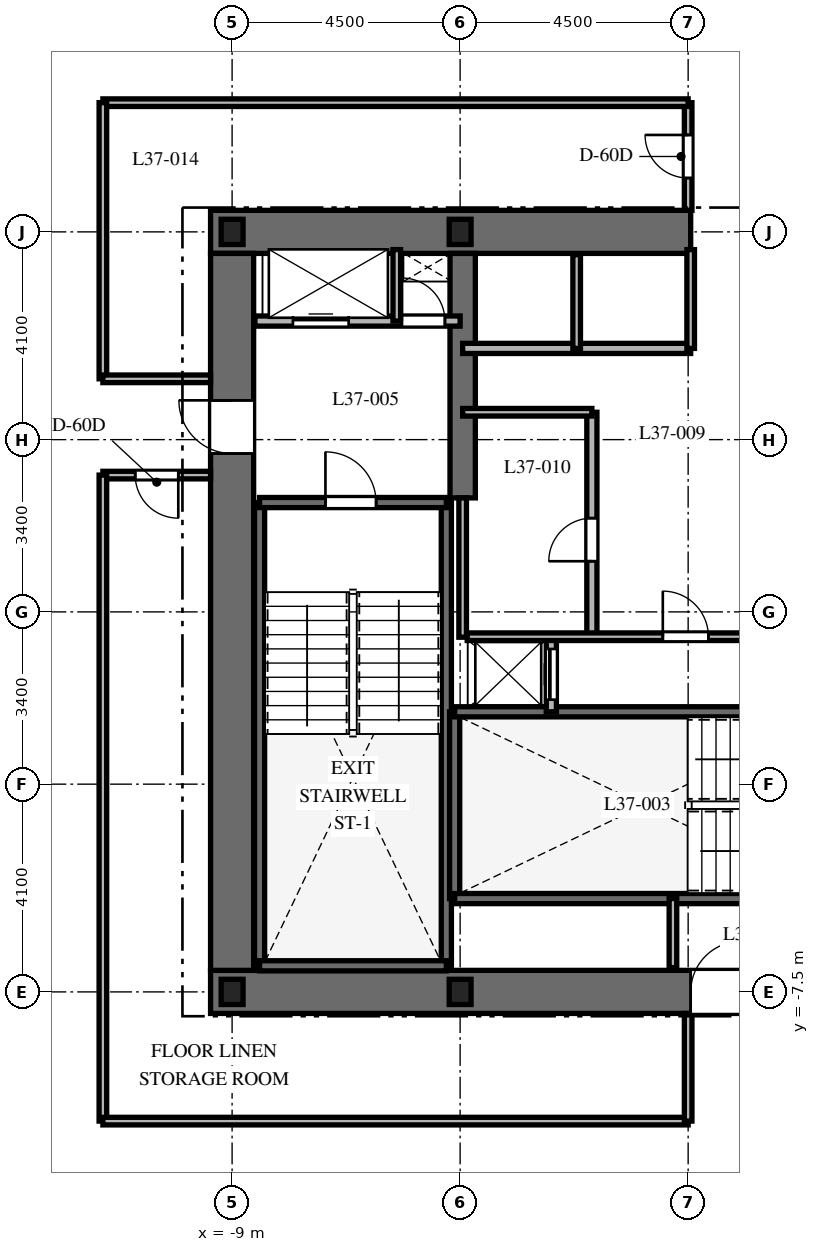
"""IFC4 building model, lengths in metres.
Left out: names, types, materials, properties, quantities, classifications, styles, units other than length and angle.
Written with IfcOpenShell. Run it as: python <this file> out.ifc"""

import sys

from ifc_helpers import new_model, si_unit, direction, frame, frame_2d, origin, origin_2d, place, context, subcontext, project, spatial, rectangle, i_section, extrude, element, fill, save


model = new_model("IFC4")
c1 = context("Model", 3, precision=1e-05, world=origin(), true_north=direction((0.0, 1.0)))
c2 = subcontext(c1, "Body", "Model", "MODEL_VIEW")
j1 = project(units=[si_unit("LENGTHUNIT", "METRE"), si_unit("PLANEANGLEUNIT", "RADIAN")], contexts=[c1])
p1 = place(None, origin())
s1 = spatial("IfcSite", under=j1, at=p1, CompositionType="ELEMENT")
p2 = place(p1, origin())
s2 = spatial("IfcBuilding", under=s1, at=p2, CompositionType="ELEMENT")
p3 = place(p2, frame((0.0, 0.0, 151.7)))
s3 = spatial("IfcBuildingStorey", under=s2, at=p3, CompositionType="ELEMENT", Elevation=151.7)
p4 = place(p3, frame((-9.425, -7.5, 0.0), z_axis=(0.0, 0.0, 1.0), x_axis=(1.0, 0.0, 0.0)))
e1 = element("IfcWall", 1, at=p4, inside=s3, PredefinedType="SHEAR", context=c2, shape_type="SweptSolid", body=[
    extrude(rectangle(XDim=18.85, YDim=0.85, at=frame_2d((9.425, 0.0))), origin(), (0.0, 0.0, 1.0), 3.7),
])
p5 = place(p4, frame((9.475, 0.0, 0.0)))
e2 = element("IfcOpeningElement", 2, at=p5, cuts=e1, PredefinedType="OPENING", context=c2, shape_type="SweptSolid", body=[
    extrude(rectangle(XDim=1.0, YDim=2.15, at=frame_2d((0.5, 1.075))), frame((0.0, 0.435, 0.0), z_axis=(0.0, -1.0, 0.0), x_axis=(1.0, 0.0, 0.0)), (0.0, 0.0, 1.0), 0.87),
])
p6 = place(p3, frame((-9.425, 7.5, 0.0), z_axis=(0.0, 0.0, 1.0), x_axis=(1.0, 0.0, 0.0)))
e3 = element("IfcWall", 3, at=p6, inside=s3, PredefinedType="SHEAR", context=c2, shape_type="SweptSolid", body=[
    extrude(rectangle(XDim=9.475, YDim=0.85, at=frame_2d((4.738, 0.0))), origin(), (0.0, 0.0, 1.0), 3.7),
])
p7 = place(p3, frame((-9.0, -7.075, 0.0), z_axis=(0.0, 0.0, 1.0), x_axis=(0.0, 1.0, 0.0)))
e4 = element("IfcWall", 4, at=p7, inside=s3, PredefinedType="SHEAR", context=c2, shape_type="SweptSolid", body=[
    extrude(rectangle(XDim=14.15, YDim=0.85, at=frame_2d((7.075, 0.0))), origin(), (0.0, 0.0, 1.0), 3.7),
])
p8 = place(p7, frame((10.2, 0.0, 0.0)))
e5 = element("IfcOpeningElement", 5, at=p8, cuts=e4, PredefinedType="OPENING", context=c2, shape_type="SweptSolid", body=[
    extrude(rectangle(XDim=1.05, YDim=2.15, at=frame_2d((0.525, 1.075))), frame((0.0, 0.435, 0.0), z_axis=(0.0, -1.0, 0.0), x_axis=(1.0, 0.0, 0.0)), (0.0, 0.0, 1.0), 0.87),
])
p9 = place(p3, frame((-4.45, 2.25, 0.0), z_axis=(0.0, 0.0, 1.0), x_axis=(0.0, 1.0, 0.0)))
e6 = element("IfcWall", 6, at=p9, inside=s3, PredefinedType="SHEAR", context=c2, shape_type="SweptSolid", body=[
    extrude(rectangle(XDim=4.825, YDim=0.5, at=frame_2d((2.413, 0.0))), origin(), (0.0, 0.0, 1.0), 3.7),
])
for number, where, z_axis, x_axis in (
    (7, (-8.458, -6.985, 0.0), (0.0, 0.0, 1.0), (0.0, 1.0, 0.0)),
    (8, (-4.772, -6.985, 0.0), (0.0, 0.0, 1.0), (0.0, 1.0, 0.0)),
):
    element("IfcWall", number, at=place(p3, frame(where, z_axis=z_axis, x_axis=x_axis)), inside=s3, PredefinedType="SHEAR", context=c2, shape_type="SweptSolid", body=[
        extrude(rectangle(XDim=9.143, YDim=0.2, at=frame_2d((4.572, 0.0))), origin(), (0.0, 0.0, 1.0), 3.7),
    ])
p10 = place(p3, frame((-8.458, -6.985, 0.0), z_axis=(0.0, 0.0, 1.0), x_axis=(1.0, 0.0, 0.0)))
e9 = element("IfcWall", 9, at=p10, inside=s3, PredefinedType="SHEAR", context=c2, shape_type="SweptSolid", body=[
    extrude(rectangle(XDim=3.686, YDim=0.2, at=frame_2d((1.843, 0.0))), origin(), (0.0, 0.0, 1.0), 3.7),
])
p11 = place(p3, frame((-8.458, 2.158, 0.0), z_axis=(0.0, 0.0, 1.0), x_axis=(1.0, 0.0, 0.0)))
e10 = element("IfcWall", 10, at=p11, inside=s3, PredefinedType="SHEAR", context=c2, shape_type="SweptSolid", body=[
    extrude(rectangle(XDim=3.686, YDim=0.2, at=frame_2d((1.843, 0.0))), origin(), (0.0, 0.0, 1.0), 3.7),
])
p12 = place(p11, frame((1.3, 0.0, 0.0)))
e11 = element("IfcOpeningElement", 11, at=p12, cuts=e10, PredefinedType="OPENING", context=c2, shape_type="SweptSolid", body=[
    extrude(rectangle(XDim=1.0, YDim=2.15, at=frame_2d((0.5, 1.075))), frame((0.0, 0.11, 0.0), z_axis=(0.0, -1.0, 0.0), x_axis=(1.0, 0.0, 0.0)), (0.0, 0.0, 1.0), 0.22),
])
p13 = place(p3, frame((-4.608, -5.658, 0.0), z_axis=(0.0, 0.0, 1.0), x_axis=(0.0, 1.0, 0.0)))
e12 = element("IfcWall", 12, at=p13, inside=s3, PredefinedType="SHEAR", context=c2, shape_type="SweptSolid", body=[
    extrude(rectangle(XDim=3.686, YDim=0.2, at=frame_2d((1.843, 0.0))), origin(), (0.0, 0.0, 1.0), 3.7),
])
p14 = place(p3, frame((-4.608, -5.658, 0.0), z_axis=(0.0, 0.0, 1.0), x_axis=(1.0, 0.0, 0.0)))
e13 = element("IfcWall", 13, at=p14, inside=s3, PredefinedType="SHEAR", context=c2, shape_type="SweptSolid", body=[
    extrude(rectangle(XDim=9.166, YDim=0.2, at=frame_2d((4.583, 0.0))), origin(), (0.0, 0.0, 1.0), 3.7),
])
p15 = place(p14, frame((7.45, 0.0, 0.0)))
e14 = element("IfcOpeningElement", 14, at=p15, cuts=e13, PredefinedType="OPENING", context=c2, shape_type="SweptSolid", body=[
    extrude(rectangle(XDim=1.0, YDim=2.15, at=frame_2d((0.5, 1.075))), frame((0.0, 0.11, 0.0), z_axis=(0.0, -1.0, 0.0), x_axis=(1.0, 0.0, 0.0)), (0.0, 0.0, 1.0), 0.22),
])
p16 = place(p3, frame((-4.608, -1.972, 0.0), z_axis=(0.0, 0.0, 1.0), x_axis=(1.0, 0.0, 0.0)))
e15 = element("IfcWall", 15, at=p16, inside=s3, PredefinedType="SHEAR", context=c2, shape_type="SweptSolid", body=[
    extrude(rectangle(XDim=9.166, YDim=0.2, at=frame_2d((4.583, 0.0))), origin(), (0.0, 0.0, 1.0), 3.7),
])
for number, where, z_axis, x_axis in (
    (16, (-9.0, -7.5, 0.0), (0.0, 0.0, 1.0), (1.0, 0.0, 0.0)),
    (17, (-4.5, -7.5, 0.0), (0.0, 0.0, 1.0), (1.0, 0.0, 0.0)),
    (18, (-4.5, 7.5, 0.0), (0.0, 0.0, 1.0), (1.0, 0.0, 0.0)),
    (19, (-9.0, 7.5, 0.0), (0.0, 0.0, 1.0), (1.0, 0.0, 0.0)),
):
    element("IfcColumn", number, at=place(p3, frame(where, z_axis=z_axis, x_axis=x_axis)), inside=s3, PredefinedType="COLUMN", context=c2, shape_type="SweptSolid", body=[
        extrude(i_section(OverallWidth=0.432, OverallDepth=0.498, WebThickness=0.056, FlangeThickness=0.089, at=origin_2d()), origin(), (0.0, 0.0, 1.0), 3.7),
    ])
p17 = place(p3, frame((-0.3, -7.02, 0.0), z_axis=(0.0, 0.0, 1.0), x_axis=(0.0, 1.0, 0.0)))
e20 = element("IfcWall", 20, at=p17, inside=s3, PredefinedType="PARTITIONING", context=c2, shape_type="SweptSolid", body=[
    extrude(rectangle(XDim=1.362, YDim=0.15, at=frame_2d((0.681, 0.0))), origin(), (0.0, 0.0, 1.0), 3.4),
])
p18 = place(p3, frame((-8.55, 5.74, 0.0), z_axis=(0.0, 0.0, 1.0), x_axis=(1.0, 0.0, 0.0)))
e21 = element("IfcWall", 21, at=p18, inside=s3, PredefinedType="PARTITIONING", context=c2, shape_type="SweptSolid", body=[
    extrude(rectangle(XDim=4.05, YDim=0.2, at=frame_2d((2.025, 0.0))), origin(), (0.0, 0.0, 1.0), 3.4),
])
p19 = place(p18, frame((0.75, 0.0, 0.0)))
e22 = element("IfcOpeningElement", 22, at=p19, cuts=e21, PredefinedType="OPENING", context=c2, shape_type="SweptSolid", body=[
    extrude(rectangle(XDim=1.1, YDim=2.2, at=frame_2d((0.55, 1.1))), frame((0.0, 0.11, 0.0), z_axis=(0.0, -1.0, 0.0), x_axis=(1.0, 0.0, 0.0)), (0.0, 0.0, 1.0), 0.22),
])
p20 = place(p18, frame((2.9, 0.0, 0.0)))
e23 = element("IfcOpeningElement", 23, at=p20, cuts=e21, PredefinedType="OPENING", context=c2, shape_type="SweptSolid", body=[
    extrude(rectangle(XDim=0.85, YDim=2.03, at=frame_2d((0.425, 1.015))), frame((0.0, 0.11, 0.0), z_axis=(0.0, -1.0, 0.0), x_axis=(1.0, 0.0, 0.0)), (0.0, 0.0, 1.0), 0.22),
])
p21 = place(p3, frame((-5.75, 5.74, 0.0), z_axis=(0.0, 0.0, 1.0), x_axis=(0.0, 1.0, 0.0)))
e24 = element("IfcWall", 24, at=p21, inside=s3, PredefinedType="PARTITIONING", context=c2, shape_type="SweptSolid", body=[
    extrude(rectangle(XDim=1.41, YDim=0.15, at=frame_2d((0.705, 0.0))), origin(), (0.0, 0.0, 1.0), 3.4),
])
p22 = place(p3, frame((-2.7, -1.972, 0.0), z_axis=(0.0, 0.0, 1.0), x_axis=(0.0, 1.0, 0.0)))
e25 = element("IfcWall", 25, at=p22, inside=s3, PredefinedType="PARTITIONING", context=c2, shape_type="SweptSolid", body=[
    extrude(rectangle(XDim=1.472, YDim=0.2, at=frame_2d((0.736, 0.0))), origin(), (0.0, 0.0, 1.0), 3.4),
])
p23 = place(p22, frame((0.24, 0.0, 0.0)))
e26 = element("IfcOpeningElement", 26, at=p23, cuts=e25, PredefinedType="OPENING", context=c2, shape_type="SweptSolid", body=[
    extrude(rectangle(XDim=1.0, YDim=2.2, at=frame_2d((0.5, 1.1))), frame((0.0, 0.11, 0.0), z_axis=(0.0, -1.0, 0.0), x_axis=(1.0, 0.0, 0.0)), (0.0, 0.0, 1.0), 0.22),
])
p24 = place(p3, frame((-4.45, 5.2, 0.0), z_axis=(0.0, 0.0, 1.0), x_axis=(1.0, 0.0, 0.0)))
e27 = element("IfcWall", 27, at=p24, inside=s3, PredefinedType="PARTITIONING", context=c2, shape_type="SweptSolid", body=[
    extrude(rectangle(XDim=4.5, YDim=0.2, at=frame_2d((2.25, 0.0))), origin(), (0.0, 0.0, 1.0), 3.4),
])
p25 = place(p3, frame((-2.2, 5.2, 0.0), z_axis=(0.0, 0.0, 1.0), x_axis=(0.0, 1.0, 0.0)))
e28 = element("IfcWall", 28, at=p25, inside=s3, PredefinedType="PARTITIONING", context=c2, shape_type="SweptSolid", body=[
    extrude(rectangle(XDim=1.85, YDim=0.15, at=frame_2d((0.925, 0.0))), origin(), (0.0, 0.0, 1.0), 3.4),
])
p26 = place(p3, frame((0.05, 5.2, 0.0), z_axis=(0.0, 0.0, 1.0), x_axis=(0.0, 1.0, 0.0)))
e29 = element("IfcWall", 29, at=p26, inside=s3, PredefinedType="PARTITIONING", context=c2, shape_type="SweptSolid", body=[
    extrude(rectangle(XDim=1.95, YDim=0.15, at=frame_2d((0.975, 0.0))), origin(), (0.0, 0.0, 1.0), 3.4),
])
p27 = place(p3, frame((-4.45, -0.5, 0.0), z_axis=(0.0, 0.0, 1.0), x_axis=(0.0, 1.0, 0.0)))
e30 = element("IfcWall", 30, at=p27, inside=s3, PredefinedType="PARTITIONING", context=c2, shape_type="SweptSolid", body=[
    extrude(rectangle(XDim=2.75, YDim=0.15, at=frame_2d((1.375, 0.0))), origin(), (0.0, 0.0, 1.0), 3.4),
])
p28 = place(p3, frame((-1.9, -0.5, 0.0), z_axis=(0.0, 0.0, 1.0), x_axis=(0.0, 1.0, 0.0)))
e31 = element("IfcWall", 31, at=p28, inside=s3, PredefinedType="PARTITIONING", context=c2, shape_type="SweptSolid", body=[
    extrude(rectangle(XDim=4.44, YDim=0.2, at=frame_2d((2.22, 0.0))), origin(), (0.0, 0.0, 1.0), 3.4),
])
p29 = place(p28, frame((1.5, 0.0, 0.0)))
e32 = element("IfcOpeningElement", 32, at=p29, cuts=e31, PredefinedType="OPENING", context=c2, shape_type="SweptSolid", body=[
    extrude(rectangle(XDim=0.85, YDim=2.03, at=frame_2d((0.425, 1.015))), frame((0.0, 0.11, 0.0), z_axis=(0.0, -1.0, 0.0), x_axis=(1.0, 0.0, 0.0)), (0.0, 0.0, 1.0), 0.22),
])
p30 = place(p3, frame((-4.45, 3.94, 0.0), z_axis=(0.0, 0.0, 1.0), x_axis=(1.0, 0.0, 0.0)))
e33 = element("IfcWall", 33, at=p30, inside=s3, PredefinedType="PARTITIONING", context=c2, shape_type="SweptSolid", body=[
    extrude(rectangle(XDim=2.55, YDim=0.15, at=frame_2d((1.275, 0.0))), origin(), (0.0, 0.0, 1.0), 3.4),
])
p31 = place(p3, frame((-4.36, -0.49, 0.0), z_axis=(0.0, 0.0, 1.0), x_axis=(1.0, 0.0, 0.0)))
e34 = element("IfcWall", 34, at=p31, inside=s3, PredefinedType="PARTITIONING", context=c2, shape_type="SweptSolid", body=[
    extrude(rectangle(XDim=8.72, YDim=0.15, at=frame_2d((4.36, 0.0))), origin(), (0.0, 0.0, 1.0), 3.4),
])
p32 = place(p31, frame((3.86, 0.0, 0.0)))
e35 = element("IfcOpeningElement", 35, at=p32, cuts=e34, PredefinedType="OPENING", context=c2, shape_type="SweptSolid", body=[
    extrude(rectangle(XDim=0.9, YDim=2.03, at=frame_2d((0.45, 1.015))), frame((0.0, 0.085, 0.0), z_axis=(0.0, -1.0, 0.0), x_axis=(1.0, 0.0, 0.0)), (0.0, 0.0, 1.0), 0.17),
])
p33 = place(p3, frame((0.0, 7.925, 0.0), z_axis=(0.0, 0.0, 1.0), x_axis=(0.0, 1.0, 0.0)))
e36 = element("IfcWall", 36, at=p33, inside=s3, PredefinedType="PARTITIONING", context=c2, shape_type="SweptSolid", body=[
    extrude(rectangle(XDim=2.125, YDim=0.15, at=frame_2d((1.062, 0.0))), origin(), (0.0, 0.0, 1.0), 3.4),
])
p34 = place(p33, frame((0.638, 0.0, 0.0)))
e37 = element("IfcOpeningElement", 37, at=p34, cuts=e36, PredefinedType="OPENING", context=c2, shape_type="SweptSolid", body=[
    extrude(rectangle(XDim=0.85, YDim=2.03, at=frame_2d((0.425, 1.015))), frame((0.0, 0.085, 0.0), z_axis=(0.0, -1.0, 0.0), x_axis=(1.0, 0.0, 0.0)), (0.0, 0.0, 1.0), 0.17),
])
p35 = place(p3, frame((0.0, 10.05, 0.0), z_axis=(0.0, 0.0, 1.0), x_axis=(-1.0, 0.0, 0.0)))
e38 = element("IfcWall", 38, at=p35, inside=s3, PredefinedType="PARTITIONING", context=c2, shape_type="SweptSolid", body=[
    extrude(rectangle(XDim=11.55, YDim=0.15, at=frame_2d((5.775, 0.0))), origin(), (0.0, 0.0, 1.0), 2.84),
])
p36 = place(p3, frame((-11.55, 10.05, 0.0), z_axis=(0.0, 0.0, 1.0), x_axis=(0.0, -1.0, 0.0)))
e39 = element("IfcWall", 39, at=p36, inside=s3, PredefinedType="PARTITIONING", context=c2, shape_type="SweptSolid", body=[
    extrude(rectangle(XDim=5.45, YDim=0.15, at=frame_2d((2.725, 0.0))), origin(), (0.0, 0.0, 1.0), 2.84),
])
p37 = place(p3, frame((-11.55, 4.6, 0.0), z_axis=(0.0, 0.0, 1.0), x_axis=(1.0, 0.0, 0.0)))
e40 = element("IfcWall", 40, at=p37, inside=s3, PredefinedType="PARTITIONING", context=c2, shape_type="SweptSolid", body=[
    extrude(rectangle(XDim=2.125, YDim=0.15, at=frame_2d((1.062, 0.0))), origin(), (0.0, 0.0, 1.0), 3.4),
])
p38 = place(p3, frame((-9.425, 2.7, 0.0), z_axis=(0.0, 0.0, 1.0), x_axis=(-1.0, 0.0, 0.0)))
e41 = element("IfcWall", 41, at=p38, inside=s3, PredefinedType="PARTITIONING", context=c2, shape_type="SweptSolid", body=[
    extrude(rectangle(XDim=2.125, YDim=0.15, at=frame_2d((1.062, 0.0))), origin(), (0.0, 0.0, 1.0), 3.4),
])
p39 = place(p38, frame((0.637, 0.0, 0.0)))
e42 = element("IfcOpeningElement", 42, at=p39, cuts=e41, PredefinedType="OPENING", context=c2, shape_type="SweptSolid", body=[
    extrude(rectangle(XDim=0.85, YDim=2.03, at=frame_2d((0.425, 1.015))), frame((0.0, 0.085, 0.0), z_axis=(0.0, -1.0, 0.0), x_axis=(1.0, 0.0, 0.0)), (0.0, 0.0, 1.0), 0.17),
])
p40 = place(p3, frame((-11.55, 2.7, 0.0), z_axis=(0.0, 0.0, 1.0), x_axis=(0.0, -1.0, 0.0)))
e43 = element("IfcWall", 43, at=p40, inside=s3, PredefinedType="PARTITIONING", context=c2, shape_type="SweptSolid", body=[
    extrude(rectangle(XDim=12.75, YDim=0.15, at=frame_2d((6.375, 0.0))), origin(), (0.0, 0.0, 1.0), 2.84),
])
p41 = place(p3, frame((-11.55, -10.05, 0.0), z_axis=(0.0, 0.0, 1.0), x_axis=(1.0, 0.0, 0.0)))
e44 = element("IfcWall", 44, at=p41, inside=s3, PredefinedType="PARTITIONING", context=c2, shape_type="SweptSolid", body=[
    extrude(rectangle(XDim=11.55, YDim=0.15, at=frame_2d((5.775, 0.0))), origin(), (0.0, 0.0, 1.0), 2.84),
])
p42 = place(p3, frame((0.0, -10.05, 0.0), z_axis=(0.0, 0.0, 1.0), x_axis=(0.0, 1.0, 0.0)))
e45 = element("IfcWall", 45, at=p42, inside=s3, PredefinedType="PARTITIONING", context=c2, shape_type="SweptSolid", body=[
    extrude(rectangle(XDim=2.125, YDim=0.15, at=frame_2d((1.062, 0.0))), origin(), (0.0, 0.0, 1.0), 3.4),
])
p43 = place(p12, origin())
e46 = element("IfcDoor", 46, at=p43, inside=s3, OperationType="SINGLE_SWING_LEFT", PredefinedType="DOOR", context=c2, shape_type="SweptSolid", body=[
    extrude(rectangle(XDim=1.0, YDim=2.15, at=frame_2d((0.5, 1.075))), frame((0.0, 0.025, 0.0), z_axis=(0.0, -1.0, 0.0), x_axis=(1.0, 0.0, 0.0)), (0.0, 0.0, 1.0), 0.05),
])
fill(e11, e46)
p44 = place(p5, origin())
e47 = element("IfcDoor", 47, at=p44, inside=s3, OperationType="SINGLE_SWING_RIGHT", PredefinedType="DOOR", context=c2, shape_type="SweptSolid", body=[
    extrude(rectangle(XDim=1.0, YDim=2.15, at=frame_2d((0.5, 1.075))), frame((0.0, 0.025, 0.0), z_axis=(0.0, -1.0, 0.0), x_axis=(1.0, 0.0, 0.0)), (0.0, 0.0, 1.0), 0.05),
])
fill(e2, e47)
p45 = place(p8, origin())
e48 = element("IfcDoor", 48, at=p45, inside=s3, OperationType="SINGLE_SWING_RIGHT", PredefinedType="DOOR", context=c2, shape_type="SweptSolid", body=[
    extrude(rectangle(XDim=1.05, YDim=2.15, at=frame_2d((0.525, 1.075))), frame((0.0, 0.025, 0.0), z_axis=(0.0, -1.0, 0.0), x_axis=(1.0, 0.0, 0.0)), (0.0, 0.0, 1.0), 0.05),
])
fill(e5, e48)
p46 = place(p19, origin())
e49 = element("IfcDoor", 49, at=p46, inside=s3, OperationType="SLIDING_TO_LEFT", PredefinedType="DOOR", context=c2, shape_type="SweptSolid", body=[
    extrude(rectangle(XDim=1.1, YDim=2.2, at=frame_2d((0.55, 1.1))), frame((0.0, 0.025, 0.0), z_axis=(0.0, -1.0, 0.0), x_axis=(1.0, 0.0, 0.0)), (0.0, 0.0, 1.0), 0.05),
])
fill(e22, e49)
p47 = place(p20, origin())
e50 = element("IfcDoor", 50, at=p47, inside=s3, OperationType="SINGLE_SWING_LEFT", PredefinedType="DOOR", context=c2, shape_type="SweptSolid", body=[
    extrude(rectangle(XDim=0.85, YDim=2.03, at=frame_2d((0.425, 1.015))), frame((0.0, 0.025, 0.0), z_axis=(0.0, -1.0, 0.0), x_axis=(1.0, 0.0, 0.0)), (0.0, 0.0, 1.0), 0.05),
])
fill(e23, e50)
p48 = place(p23, origin())
e51 = element("IfcDoor", 51, at=p48, inside=s3, OperationType="SLIDING_TO_LEFT", PredefinedType="DOOR", context=c2, shape_type="SweptSolid", body=[
    extrude(rectangle(XDim=1.0, YDim=2.2, at=frame_2d((0.5, 1.1))), frame((0.0, 0.025, 0.0), z_axis=(0.0, -1.0, 0.0), x_axis=(1.0, 0.0, 0.0)), (0.0, 0.0, 1.0), 0.05),
])
fill(e26, e51)
p49 = place(p29, origin())
e52 = element("IfcDoor", 52, at=p49, inside=s3, OperationType="SINGLE_SWING_LEFT", PredefinedType="DOOR", context=c2, shape_type="SweptSolid", body=[
    extrude(rectangle(XDim=0.85, YDim=2.03, at=frame_2d((0.425, 1.015))), frame((0.0, 0.025, 0.0), z_axis=(0.0, -1.0, 0.0), x_axis=(1.0, 0.0, 0.0)), (0.0, 0.0, 1.0), 0.05),
])
fill(e32, e52)
p50 = place(p32, origin())
e53 = element("IfcDoor", 53, at=p50, inside=s3, OperationType="SINGLE_SWING_LEFT", PredefinedType="DOOR", context=c2, shape_type="SweptSolid", body=[
    extrude(rectangle(XDim=0.9, YDim=2.03, at=frame_2d((0.45, 1.015))), frame((0.0, 0.025, 0.0), z_axis=(0.0, -1.0, 0.0), x_axis=(1.0, 0.0, 0.0)), (0.0, 0.0, 1.0), 0.05),
])
fill(e35, e53)
p51 = place(p39, origin())
e54 = element("IfcDoor", 54, at=p51, inside=s3, OperationType="SINGLE_SWING_LEFT", PredefinedType="DOOR", context=c2, shape_type="SweptSolid", body=[
    extrude(rectangle(XDim=0.85, YDim=2.03, at=frame_2d((0.425, 1.015))), frame((0.0, 0.025, 0.0), z_axis=(0.0, -1.0, 0.0), x_axis=(1.0, 0.0, 0.0)), (0.0, 0.0, 1.0), 0.05),
])
fill(e42, e54)
p52 = place(p34, origin())
e55 = element("IfcDoor", 55, at=p52, inside=s3, OperationType="SINGLE_SWING_RIGHT", PredefinedType="DOOR", context=c2, shape_type="SweptSolid", body=[
    extrude(rectangle(XDim=0.85, YDim=2.03, at=frame_2d((0.425, 1.015))), frame((0.0, 0.025, 0.0), z_axis=(0.0, -1.0, 0.0), x_axis=(1.0, 0.0, 0.0)), (0.0, 0.0, 1.0), 0.05),
])
fill(e37, e55)
save(model, sys.argv[1])
